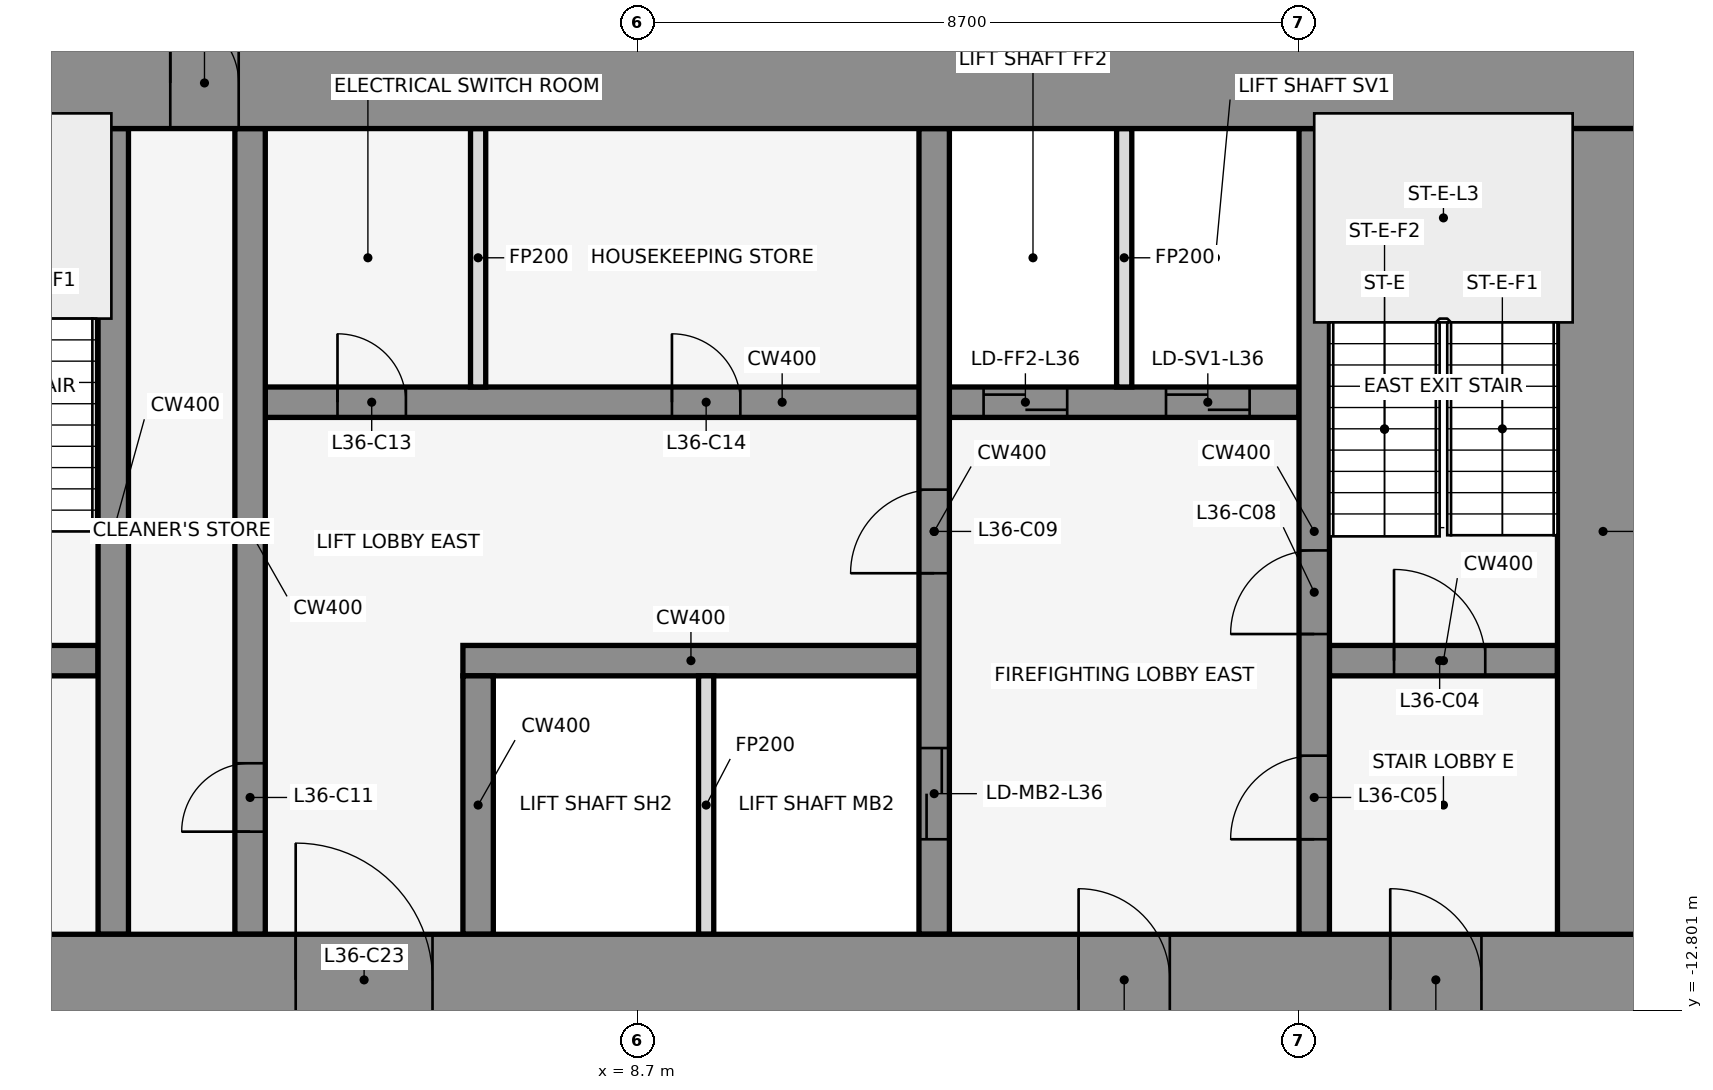
"""IFC4 building model, lengths in metres.
Left out: names, types, materials, properties, quantities, classifications, styles, units other than length and angle.
Written with IfcOpenShell. Run it as: python <this file> out.ifc"""

import sys

from ifc_helpers import new_model, si_unit, direction, frame, frame_2d, origin, place, context, subcontext, project, spatial, rectangle, extrude, element, fill, save


model = new_model("IFC4")
c1 = context("Model", 3, precision=1e-05, world=origin(), true_north=direction((0.0, 1.0)))
c2 = subcontext(c1, "Body", "Model", "MODEL_VIEW")
j1 = project(units=[si_unit("LENGTHUNIT", "METRE"), si_unit("PLANEANGLEUNIT", "RADIAN")], contexts=[c1])
p1 = place(None, origin())
s1 = spatial("IfcSite", under=j1, at=p1, CompositionType="ELEMENT")
p2 = place(p1, origin())
s2 = spatial("IfcBuilding", under=s1, at=p2, CompositionType="ELEMENT")
p3 = place(p2, frame((0.0, 0.0, 165.0)))
s3 = spatial("IfcBuildingStorey", under=s2, at=p3, CompositionType="ELEMENT", Elevation=165.0)
for number, where, z_axis, x_axis in (
    (1, (16.432, -0.105, 0.0), (0.0, 0.0, 1.0), (-0.84, 0.543, 0.0)),
    (2, (1.901, 1.08, 0.0), (0.0, 0.0, 1.0), (-0.84, -0.543, 0.0)),
):
    element("IfcWall", number, at=place(p3, frame(where, z_axis=z_axis, x_axis=x_axis)), inside=s3, PredefinedType="STANDARD", context=c2, shape_type="SweptSolid", body=[
        extrude(rectangle(XDim=2.183, YDim=0.25, at=frame_2d((1.091, 0.0))), origin(), (0.0, 0.0, 1.0), 3.95),
    ])
p4 = place(p3, frame((-1.6, -8.2, 0.0), z_axis=(0.0, 0.0, 1.0), x_axis=(1.0, 0.0, 0.0)))
e3 = element("IfcWall", 3, at=p4, inside=s3, PredefinedType="SHEAR", context=c2, shape_type="SweptSolid", body=[
    extrude(rectangle(XDim=3.2, YDim=0.4, at=frame_2d((1.6, 0.0))), origin(), (0.0, 0.0, 1.0), 4.1),
])
p5 = place(p4, frame((1.05, 0.0, 0.0)))
e4 = element("IfcOpeningElement", 4, at=p5, cuts=e3, PredefinedType="OPENING", context=c2, shape_type="SweptSolid", body=[
    extrude(rectangle(XDim=1.2, YDim=2.1, at=frame_2d((0.6, 1.05))), frame((0.0, 0.212, 0.0), z_axis=(0.0, -1.0, 0.0), x_axis=(1.0, 0.0, 0.0)), (0.0, 0.0, 1.0), 0.424),
])
p6 = place(p3, frame((6.4, -8.2, 0.0), z_axis=(0.0, 0.0, 1.0), x_axis=(1.0, 0.0, 0.0)))
e5 = element("IfcWall", 5, at=p6, inside=s3, PredefinedType="SHEAR", context=c2, shape_type="SweptSolid", body=[
    extrude(rectangle(XDim=6.0, YDim=0.4, at=frame_2d((3.0, 0.0))), origin(), (0.0, 0.0, 1.0), 4.1),
])
p7 = place(p3, frame((17.8, -8.2, 0.0), z_axis=(0.0, 0.0, 1.0), x_axis=(1.0, 0.0, 0.0)))
e6 = element("IfcWall", 6, at=p7, inside=s3, PredefinedType="SHEAR", context=c2, shape_type="SweptSolid", body=[
    extrude(rectangle(XDim=3.0, YDim=0.4, at=frame_2d((1.5, 0.0))), origin(), (0.0, 0.0, 1.0), 4.1),
])
p8 = place(p7, frame((0.85, 0.0, 0.0)))
e7 = element("IfcOpeningElement", 7, at=p8, cuts=e6, PredefinedType="OPENING", context=c2, shape_type="SweptSolid", body=[
    extrude(rectangle(XDim=1.2, YDim=2.1, at=frame_2d((0.6, 1.05))), frame((0.0, 0.212, 0.0), z_axis=(0.0, -1.0, 0.0), x_axis=(1.0, 0.0, 0.0)), (0.0, 0.0, 1.0), 0.424),
])
p9 = place(p3, frame((3.8, -4.8, 0.0), z_axis=(0.0, 0.0, 1.0), x_axis=(1.0, 0.0, 0.0)))
e8 = element("IfcWall", 8, at=p9, inside=s3, PredefinedType="SHEAR", context=c2, shape_type="SweptSolid", body=[
    extrude(rectangle(XDim=13.6, YDim=0.4, at=frame_2d((6.8, 0.0))), origin(), (0.0, 0.0, 1.0), 4.1),
])
p10 = place(p9, frame((9.45, 0.0, 0.0)))
e9 = element("IfcOpeningElement", 9, at=p10, cuts=e8, PredefinedType="OPENING", context=c2, shape_type="SweptSolid", body=[
    extrude(rectangle(XDim=1.1, YDim=2.1, at=frame_2d((0.55, 1.05))), frame((0.0, 0.212, 0.0), z_axis=(0.0, -1.0, 0.0), x_axis=(1.0, 0.0, 0.0)), (0.0, 0.0, 1.0), 0.424),
])
p11 = place(p9, frame((11.85, 0.0, 0.0)))
e10 = element("IfcOpeningElement", 10, at=p11, cuts=e8, PredefinedType="OPENING", context=c2, shape_type="SweptSolid", body=[
    extrude(rectangle(XDim=1.1, YDim=2.1, at=frame_2d((0.55, 1.05))), frame((0.0, 0.212, 0.0), z_axis=(0.0, -1.0, 0.0), x_axis=(1.0, 0.0, 0.0)), (0.0, 0.0, 1.0), 0.424),
])
p12 = place(p9, frame((0.95, 0.0, 0.0)))
e11 = element("IfcOpeningElement", 11, at=p12, cuts=e8, PredefinedType="OPENING", context=c2, shape_type="SweptSolid", body=[
    extrude(rectangle(XDim=0.9, YDim=2.1, at=frame_2d((0.45, 1.05))), frame((0.0, 0.212, 0.0), z_axis=(0.0, -1.0, 0.0), x_axis=(1.0, 0.0, 0.0)), (0.0, 0.0, 1.0), 0.424),
])
p13 = place(p9, frame((5.35, 0.0, 0.0)))
e12 = element("IfcOpeningElement", 12, at=p13, cuts=e8, PredefinedType="OPENING", context=c2, shape_type="SweptSolid", body=[
    extrude(rectangle(XDim=0.9, YDim=2.1, at=frame_2d((0.45, 1.05))), frame((0.0, 0.212, 0.0), z_axis=(0.0, -1.0, 0.0), x_axis=(1.0, 0.0, 0.0)), (0.0, 0.0, 1.0), 0.424),
])
p14 = place(p3, frame((1.8, -11.8, 0.0), z_axis=(0.0, 0.0, 1.0), x_axis=(0.0, 1.0, 0.0)))
e13 = element("IfcWall", 13, at=p14, inside=s3, PredefinedType="SHEAR", context=c2, shape_type="SweptSolid", body=[
    extrude(rectangle(XDim=10.6, YDim=0.4, at=frame_2d((5.3, 0.0))), origin(), (0.0, 0.0, 1.0), 4.1),
])
p15 = place(p3, frame((3.6, -11.8, 0.0), z_axis=(0.0, 0.0, 1.0), x_axis=(0.0, 1.0, 0.0)))
e14 = element("IfcWall", 14, at=p15, inside=s3, PredefinedType="SHEAR", context=c2, shape_type="SweptSolid", body=[
    extrude(rectangle(XDim=10.6, YDim=0.4, at=frame_2d((5.3, 0.0))), origin(), (0.0, 0.0, 1.0), 4.1),
])
p16 = place(p15, frame((1.35, 0.0, 0.0)))
e15 = element("IfcOpeningElement", 15, at=p16, cuts=e14, PredefinedType="OPENING", context=c2, shape_type="SweptSolid", body=[
    extrude(rectangle(XDim=0.9, YDim=2.1, at=frame_2d((0.45, 1.05))), frame((0.0, 0.212, 0.0), z_axis=(0.0, -1.0, 0.0), x_axis=(1.0, 0.0, 0.0)), (0.0, 0.0, 1.0), 0.424),
])
p17 = place(p3, frame((6.6, -11.8, 0.0), z_axis=(0.0, 0.0, 1.0), x_axis=(0.0, 1.0, 0.0)))
e16 = element("IfcWall", 16, at=p17, inside=s3, PredefinedType="SHEAR", context=c2, shape_type="SweptSolid", body=[
    extrude(rectangle(XDim=3.4, YDim=0.4, at=frame_2d((1.7, 0.0))), origin(), (0.0, 0.0, 1.0), 4.1),
])
for number, where, z_axis, x_axis in (
    (17, (6.6, -4.6, 0.0), (0.0, 0.0, 1.0), (0.0, 1.0, 0.0)),
    (18, (9.6, -11.8, 0.0), (0.0, 0.0, 1.0), (0.0, 1.0, 0.0)),
):
    element("IfcWall", number, at=place(p3, frame(where, z_axis=z_axis, x_axis=x_axis)), inside=s3, PredefinedType="PARTITIONING", context=c2, shape_type="SweptSolid", body=[
        extrude(rectangle(XDim=3.4, YDim=0.2, at=frame_2d((1.7, 0.0))), origin(), (0.0, 0.0, 1.0), 2.84),
    ])
p18 = place(p3, frame((12.6, -11.8, 0.0), z_axis=(0.0, 0.0, 1.0), x_axis=(0.0, 1.0, 0.0)))
e19 = element("IfcWall", 19, at=p18, inside=s3, PredefinedType="SHEAR", context=c2, shape_type="SweptSolid", body=[
    extrude(rectangle(XDim=10.6, YDim=0.4, at=frame_2d((5.3, 0.0))), origin(), (0.0, 0.0, 1.0), 4.1),
])
p19 = place(p18, frame((1.25, 0.0, 0.0)))
e20 = element("IfcOpeningElement", 20, at=p19, cuts=e19, PredefinedType="OPENING", context=c2, shape_type="SweptSolid", body=[
    extrude(rectangle(XDim=1.2, YDim=2.1, at=frame_2d((0.6, 1.05))), frame((0.0, 0.212, 0.0), z_axis=(0.0, -1.0, 0.0), x_axis=(1.0, 0.0, 0.0)), (0.0, 0.0, 1.0), 0.424),
])
p20 = place(p18, frame((4.75, 0.0, 0.0)))
e21 = element("IfcOpeningElement", 21, at=p20, cuts=e19, PredefinedType="OPENING", context=c2, shape_type="SweptSolid", body=[
    extrude(rectangle(XDim=1.1, YDim=2.1, at=frame_2d((0.55, 1.05))), frame((0.0, 0.212, 0.0), z_axis=(0.0, -1.0, 0.0), x_axis=(1.0, 0.0, 0.0)), (0.0, 0.0, 1.0), 0.424),
])
p21 = place(p3, frame((15.1, -4.6, 0.0), z_axis=(0.0, 0.0, 1.0), x_axis=(0.0, 1.0, 0.0)))
e22 = element("IfcWall", 22, at=p21, inside=s3, PredefinedType="PARTITIONING", context=c2, shape_type="SweptSolid", body=[
    extrude(rectangle(XDim=3.4, YDim=0.2, at=frame_2d((1.7, 0.0))), origin(), (0.0, 0.0, 1.0), 2.84),
])
p22 = place(p3, frame((17.6, -11.8, 0.0), z_axis=(0.0, 0.0, 1.0), x_axis=(0.0, 1.0, 0.0)))
e23 = element("IfcWall", 23, at=p22, inside=s3, PredefinedType="SHEAR", context=c2, shape_type="SweptSolid", body=[
    extrude(rectangle(XDim=10.6, YDim=0.4, at=frame_2d((5.3, 0.0))), origin(), (0.0, 0.0, 1.0), 4.1),
])
p23 = place(p22, frame((1.25, 0.0, 0.0)))
e24 = element("IfcOpeningElement", 24, at=p23, cuts=e23, PredefinedType="OPENING", context=c2, shape_type="SweptSolid", body=[
    extrude(rectangle(XDim=1.1, YDim=2.1, at=frame_2d((0.55, 1.05))), frame((0.0, 0.212, 0.0), z_axis=(0.0, -1.0, 0.0), x_axis=(1.0, 0.0, 0.0)), (0.0, 0.0, 1.0), 0.424),
])
p24 = place(p22, frame((3.95, 0.0, 0.0)))
e25 = element("IfcOpeningElement", 25, at=p24, cuts=e23, PredefinedType="OPENING", context=c2, shape_type="SweptSolid", body=[
    extrude(rectangle(XDim=1.1, YDim=2.1, at=frame_2d((0.55, 1.05))), frame((0.0, 0.212, 0.0), z_axis=(0.0, -1.0, 0.0), x_axis=(1.0, 0.0, 0.0)), (0.0, 0.0, 1.0), 0.424),
])
p25 = place(p3, frame((-22.0, -0.6, 0.0), z_axis=(0.0, 0.0, 1.0), x_axis=(1.0, 0.0, 0.0)))
e26 = element("IfcWall", 26, at=p25, inside=s3, PredefinedType="SHEAR", context=c2, shape_type="SweptSolid", body=[
    extrude(rectangle(XDim=44.0, YDim=1.2, at=frame_2d((22.0, 0.0))), origin(), (0.0, 0.0, 1.0), 4.1),
])
p26 = place(p25, frame((18.55, 0.0, 0.0)))
e27 = element("IfcOpeningElement", 27, at=p26, cuts=e26, PredefinedType="OPENING", context=c2, shape_type="SweptSolid", body=[
    extrude(rectangle(XDim=0.9, YDim=2.1, at=frame_2d((0.45, 1.05))), frame((0.0, 0.612, 0.0), z_axis=(0.0, -1.0, 0.0), x_axis=(1.0, 0.0, 0.0)), (0.0, 0.0, 1.0), 1.224),
])
p27 = place(p25, frame((24.55, 0.0, 0.0)))
e28 = element("IfcOpeningElement", 28, at=p27, cuts=e26, PredefinedType="OPENING", context=c2, shape_type="SweptSolid", body=[
    extrude(rectangle(XDim=0.9, YDim=2.1, at=frame_2d((0.45, 1.05))), frame((0.0, 0.612, 0.0), z_axis=(0.0, -1.0, 0.0), x_axis=(1.0, 0.0, 0.0)), (0.0, 0.0, 1.0), 1.224),
])
p28 = place(p3, frame((-22.0, -12.4, 0.0), z_axis=(0.0, 0.0, 1.0), x_axis=(1.0, 0.0, 0.0)))
e29 = element("IfcWall", 29, at=p28, inside=s3, PredefinedType="SHEAR", context=c2, shape_type="SweptSolid", body=[
    extrude(rectangle(XDim=44.0, YDim=1.2, at=frame_2d((22.0, 0.0))), origin(), (0.0, 0.0, 1.0), 4.1),
])
p29 = place(p28, frame((2.2, 0.0, 0.0)))
e30 = element("IfcOpeningElement", 30, at=p29, cuts=e29, PredefinedType="OPENING", context=c2, shape_type="SweptSolid", body=[
    extrude(rectangle(XDim=1.2, YDim=2.1, at=frame_2d((0.6, 1.05))), frame((0.0, 0.612, 0.0), z_axis=(0.0, -1.0, 0.0), x_axis=(1.0, 0.0, 0.0)), (0.0, 0.0, 1.0), 1.224),
])
p30 = place(p28, frame((21.4, 0.0, 0.0)))
e31 = element("IfcOpeningElement", 31, at=p30, cuts=e29, PredefinedType="OPENING", context=c2, shape_type="SweptSolid", body=[
    extrude(rectangle(XDim=1.2, YDim=2.1, at=frame_2d((0.6, 1.05))), frame((0.0, 0.612, 0.0), z_axis=(0.0, -1.0, 0.0), x_axis=(1.0, 0.0, 0.0)), (0.0, 0.0, 1.0), 1.224),
])
p31 = place(p28, frame((40.6, 0.0, 0.0)))
e32 = element("IfcOpeningElement", 32, at=p31, cuts=e29, PredefinedType="OPENING", context=c2, shape_type="SweptSolid", body=[
    extrude(rectangle(XDim=1.2, YDim=2.1, at=frame_2d((0.6, 1.05))), frame((0.0, 0.612, 0.0), z_axis=(0.0, -1.0, 0.0), x_axis=(1.0, 0.0, 0.0)), (0.0, 0.0, 1.0), 1.224),
])
p32 = place(p28, frame((16.0, 0.0, 0.0)))
e33 = element("IfcOpeningElement", 33, at=p32, cuts=e29, PredefinedType="OPENING", context=c2, shape_type="SweptSolid", body=[
    extrude(rectangle(XDim=1.8, YDim=2.1, at=frame_2d((0.9, 1.05))), frame((0.0, 0.612, 0.0), z_axis=(0.0, -1.0, 0.0), x_axis=(1.0, 0.0, 0.0)), (0.0, 0.0, 1.0), 1.224),
])
p33 = place(p28, frame((6.3, 0.0, 0.0)))
e34 = element("IfcOpeningElement", 34, at=p33, cuts=e29, PredefinedType="OPENING", context=c2, shape_type="SweptSolid", body=[
    extrude(rectangle(XDim=1.2, YDim=2.1, at=frame_2d((0.6, 1.05))), frame((0.0, 0.612, 0.0), z_axis=(0.0, -1.0, 0.0), x_axis=(1.0, 0.0, 0.0)), (0.0, 0.0, 1.0), 1.224),
])
p34 = place(p28, frame((26.2, 0.0, 0.0)))
e35 = element("IfcOpeningElement", 35, at=p34, cuts=e29, PredefinedType="OPENING", context=c2, shape_type="SweptSolid", body=[
    extrude(rectangle(XDim=1.8, YDim=2.1, at=frame_2d((0.9, 1.05))), frame((0.0, 0.612, 0.0), z_axis=(0.0, -1.0, 0.0), x_axis=(1.0, 0.0, 0.0)), (0.0, 0.0, 1.0), 1.224),
])
p35 = place(p28, frame((36.5, 0.0, 0.0)))
e36 = element("IfcOpeningElement", 36, at=p35, cuts=e29, PredefinedType="OPENING", context=c2, shape_type="SweptSolid", body=[
    extrude(rectangle(XDim=1.2, YDim=2.1, at=frame_2d((0.6, 1.05))), frame((0.0, 0.612, 0.0), z_axis=(0.0, -1.0, 0.0), x_axis=(1.0, 0.0, 0.0)), (0.0, 0.0, 1.0), 1.224),
])
p36 = place(p3, frame((21.4, -11.8, 0.0), z_axis=(0.0, 0.0, 1.0), x_axis=(0.0, 1.0, 0.0)))
e37 = element("IfcWall", 37, at=p36, inside=s3, PredefinedType="SHEAR", context=c2, shape_type="SweptSolid", body=[
    extrude(rectangle(XDim=10.6, YDim=1.2, at=frame_2d((5.3, 0.0))), origin(), (0.0, 0.0, 1.0), 4.1),
])
p37 = place(p8, origin())
e38 = element("IfcDoor", 38, at=p37, inside=s3, OperationType="SINGLE_SWING_RIGHT", PredefinedType="DOOR", context=c2, shape_type="SweptSolid", body=[
    extrude(rectangle(XDim=1.2, YDim=2.1, at=frame_2d((0.6, 1.05))), frame((0.0, 0.025, 0.0), z_axis=(0.0, -1.0, 0.0), x_axis=(1.0, 0.0, 0.0)), (0.0, 0.0, 1.0), 0.05),
])
fill(e7, e38)
p38 = place(p23, origin())
e39 = element("IfcDoor", 39, at=p38, inside=s3, OperationType="SINGLE_SWING_LEFT", PredefinedType="DOOR", context=c2, shape_type="SweptSolid", body=[
    extrude(rectangle(XDim=1.1, YDim=2.1, at=frame_2d((0.55, 1.05))), frame((0.0, 0.025, 0.0), z_axis=(0.0, -1.0, 0.0), x_axis=(1.0, 0.0, 0.0)), (0.0, 0.0, 1.0), 0.05),
])
fill(e24, e39)
p39 = place(p19, origin())
e40 = element("IfcDoor", 40, at=p39, inside=s3, OperationType="DOUBLE_DOOR_SLIDING", PredefinedType="DOOR", context=c2, shape_type="SweptSolid", body=[
    extrude(rectangle(XDim=1.2, YDim=2.1, at=frame_2d((0.6, 1.05))), frame((0.0, 0.025, 0.0), z_axis=(0.0, -1.0, 0.0), x_axis=(1.0, 0.0, 0.0)), (0.0, 0.0, 1.0), 0.05),
])
fill(e20, e40)
p40 = place(p10, origin())
e41 = element("IfcDoor", 41, at=p40, inside=s3, OperationType="DOUBLE_DOOR_SLIDING", PredefinedType="DOOR", context=c2, shape_type="SweptSolid", body=[
    extrude(rectangle(XDim=1.1, YDim=2.1, at=frame_2d((0.55, 1.05))), frame((0.0, 0.025, 0.0), z_axis=(0.0, -1.0, 0.0), x_axis=(1.0, 0.0, 0.0)), (0.0, 0.0, 1.0), 0.05),
])
fill(e9, e41)
p41 = place(p11, origin())
e42 = element("IfcDoor", 42, at=p41, inside=s3, OperationType="DOUBLE_DOOR_SLIDING", PredefinedType="DOOR", context=c2, shape_type="SweptSolid", body=[
    extrude(rectangle(XDim=1.1, YDim=2.1, at=frame_2d((0.55, 1.05))), frame((0.0, 0.025, 0.0), z_axis=(0.0, -1.0, 0.0), x_axis=(1.0, 0.0, 0.0)), (0.0, 0.0, 1.0), 0.05),
])
fill(e10, e42)
p42 = place(p24, origin())
e43 = element("IfcDoor", 43, at=p42, inside=s3, OperationType="SINGLE_SWING_RIGHT", PredefinedType="DOOR", context=c2, shape_type="SweptSolid", body=[
    extrude(rectangle(XDim=1.1, YDim=2.1, at=frame_2d((0.55, 1.05))), frame((0.0, 0.025, 0.0), z_axis=(0.0, -1.0, 0.0), x_axis=(1.0, 0.0, 0.0)), (0.0, 0.0, 1.0), 0.05),
])
fill(e25, e43)
p43 = place(p20, frame((1.1, 0.0, 0.0), z_axis=(0.0, 0.0, 1.0), x_axis=(-1.0, 0.0, 0.0)))
e44 = element("IfcDoor", 44, at=p43, inside=s3, OperationType="SINGLE_SWING_RIGHT", PredefinedType="DOOR", context=c2, shape_type="SweptSolid", body=[
    extrude(rectangle(XDim=1.1, YDim=2.1, at=frame_2d((0.55, 1.05))), frame((0.0, 0.025, 0.0), z_axis=(0.0, -1.0, 0.0), x_axis=(1.0, 0.0, 0.0)), (0.0, 0.0, 1.0), 0.05),
])
fill(e21, e44)
p44 = place(p16, origin())
e45 = element("IfcDoor", 45, at=p44, inside=s3, OperationType="SINGLE_SWING_LEFT", PredefinedType="DOOR", context=c2, shape_type="SweptSolid", body=[
    extrude(rectangle(XDim=0.9, YDim=2.1, at=frame_2d((0.45, 1.05))), frame((0.0, 0.025, 0.0), z_axis=(0.0, -1.0, 0.0), x_axis=(1.0, 0.0, 0.0)), (0.0, 0.0, 1.0), 0.05),
])
fill(e15, e45)
p45 = place(p12, origin())
e46 = element("IfcDoor", 46, at=p45, inside=s3, OperationType="SINGLE_SWING_LEFT", PredefinedType="DOOR", context=c2, shape_type="SweptSolid", body=[
    extrude(rectangle(XDim=0.9, YDim=2.1, at=frame_2d((0.45, 1.05))), frame((0.0, 0.025, 0.0), z_axis=(0.0, -1.0, 0.0), x_axis=(1.0, 0.0, 0.0)), (0.0, 0.0, 1.0), 0.05),
])
fill(e11, e46)
p46 = place(p13, origin())
e47 = element("IfcDoor", 47, at=p46, inside=s3, OperationType="SINGLE_SWING_RIGHT", PredefinedType="DOOR", context=c2, shape_type="SweptSolid", body=[
    extrude(rectangle(XDim=0.9, YDim=2.1, at=frame_2d((0.45, 1.05))), frame((0.0, 0.025, 0.0), z_axis=(0.0, -1.0, 0.0), x_axis=(1.0, 0.0, 0.0)), (0.0, 0.0, 1.0), 0.05),
])
fill(e12, e47)
p47 = place(p27, origin())
e48 = element("IfcDoor", 48, at=p47, inside=s3, OperationType="SINGLE_SWING_LEFT", PredefinedType="DOOR", context=c2, shape_type="SweptSolid", body=[
    extrude(rectangle(XDim=0.9, YDim=2.1, at=frame_2d((0.45, 1.05))), frame((0.0, 0.025, 0.0), z_axis=(0.0, -1.0, 0.0), x_axis=(1.0, 0.0, 0.0)), (0.0, 0.0, 1.0), 0.05),
])
fill(e28, e48)
p48 = place(p31, frame((1.2, 0.0, 0.0), z_axis=(0.0, 0.0, 1.0), x_axis=(-1.0, 0.0, 0.0)))
e49 = element("IfcDoor", 49, at=p48, inside=s3, OperationType="SINGLE_SWING_RIGHT", PredefinedType="DOOR", context=c2, shape_type="SweptSolid", body=[
    extrude(rectangle(XDim=1.2, YDim=2.1, at=frame_2d((0.6, 1.05))), frame((0.0, 0.025, 0.0), z_axis=(0.0, -1.0, 0.0), x_axis=(1.0, 0.0, 0.0)), (0.0, 0.0, 1.0), 0.05),
])
fill(e32, e49)
p49 = place(p34, origin())
e50 = element("IfcDoor", 50, at=p49, inside=s3, OperationType="SINGLE_SWING_LEFT", PredefinedType="DOOR", context=c2, shape_type="SweptSolid", body=[
    extrude(rectangle(XDim=1.8, YDim=2.1, at=frame_2d((0.9, 1.05))), frame((0.0, 0.025, 0.0), z_axis=(0.0, -1.0, 0.0), x_axis=(1.0, 0.0, 0.0)), (0.0, 0.0, 1.0), 0.05),
])
fill(e35, e50)
p50 = place(p35, frame((1.2, 0.0, 0.0), z_axis=(0.0, 0.0, 1.0), x_axis=(-1.0, 0.0, 0.0)))
e51 = element("IfcDoor", 51, at=p50, inside=s3, OperationType="SINGLE_SWING_RIGHT", PredefinedType="DOOR", context=c2, shape_type="SweptSolid", body=[
    extrude(rectangle(XDim=1.2, YDim=2.1, at=frame_2d((0.6, 1.05))), frame((0.0, 0.025, 0.0), z_axis=(0.0, -1.0, 0.0), x_axis=(1.0, 0.0, 0.0)), (0.0, 0.0, 1.0), 0.05),
])
fill(e36, e51)
save(model, sys.argv[1])
